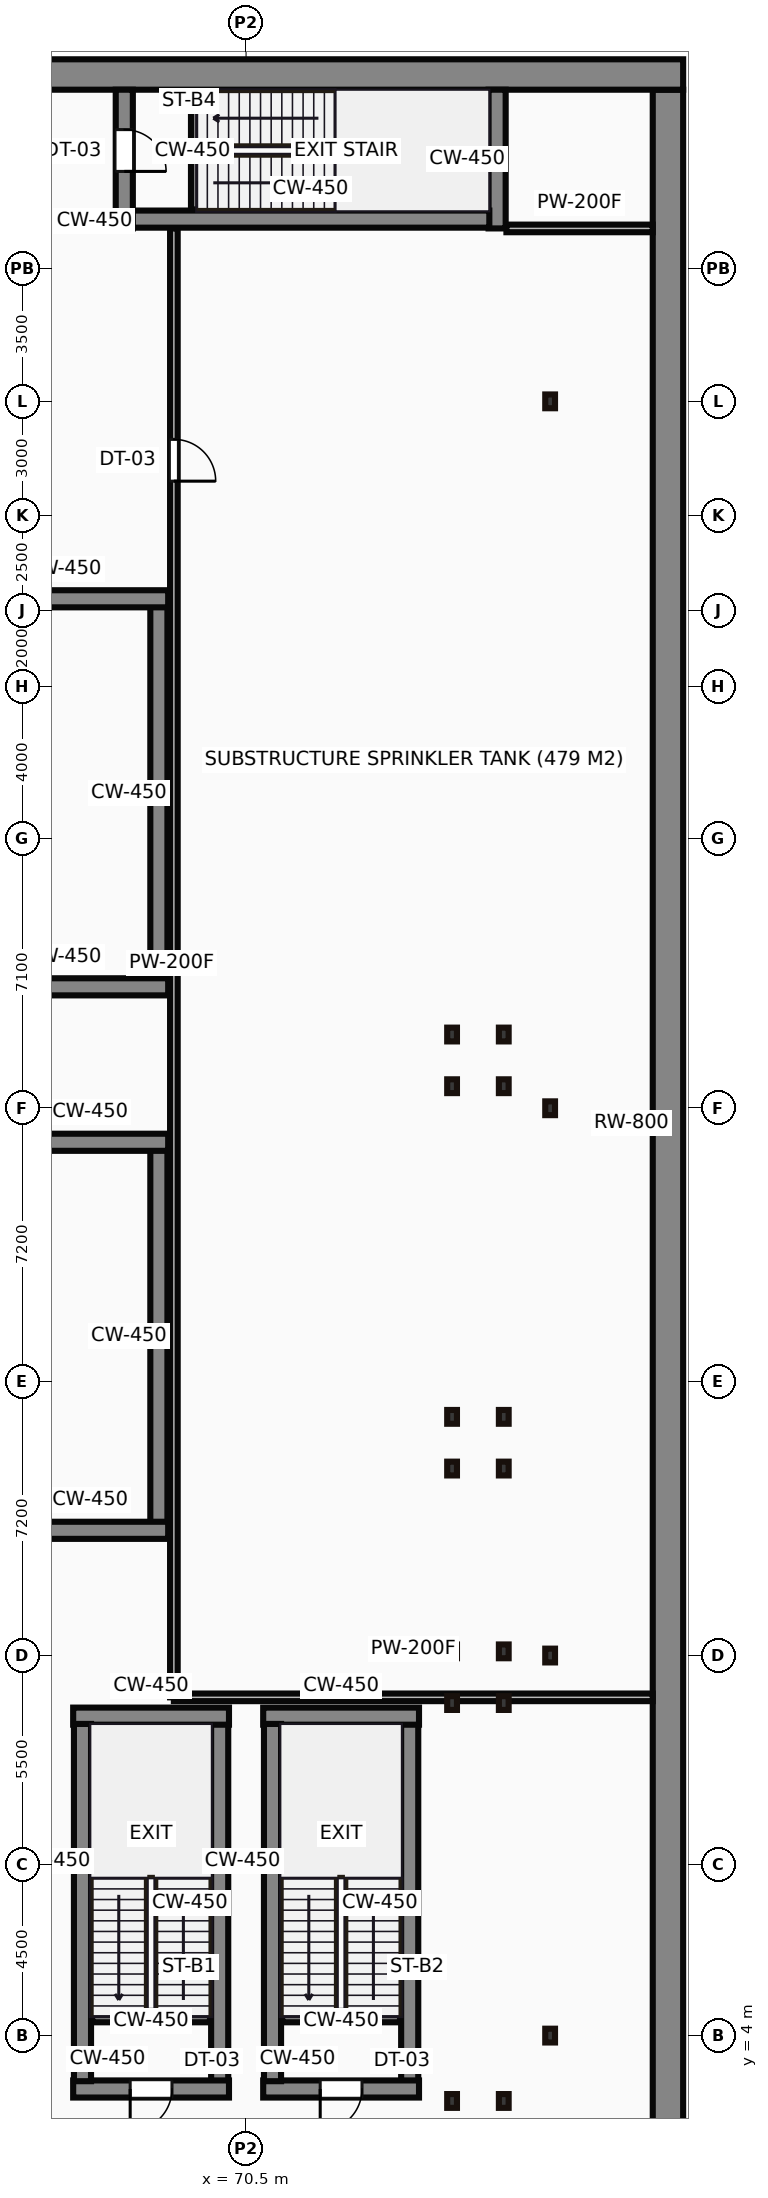
"""IFC4 building model, lengths in metres.
Left out: names, types, materials, properties, quantities, classifications, styles, units other than length and angle.
Written with IfcOpenShell. Run it as: python <this file> out.ifc"""

import sys

from ifc_helpers import new_model, si_unit, direction, frame, frame_2d, origin, origin_2d, place, context, subcontext, project, spatial, rectangle, i_section, extrude, source, transform, mapped, element, fill, save


model = new_model("IFC4")
c1 = context("Model", 3, precision=1e-05, world=origin(), true_north=direction((0.0, 1.0)))
c2 = subcontext(c1, "Body", "Model", "MODEL_VIEW")
j1 = project(units=[si_unit("LENGTHUNIT", "METRE"), si_unit("PLANEANGLEUNIT", "RADIAN")], contexts=[c1])
p1 = place(None, origin())
s1 = spatial("IfcSite", under=j1, at=p1, CompositionType="ELEMENT")
p2 = place(p1, origin())
s2 = spatial("IfcBuilding", under=s1, at=p2, CompositionType="ELEMENT")
p3 = place(p2, frame((0.0, 0.0, -10.0)))
s3 = spatial("IfcBuildingStorey", under=s2, at=p3, CompositionType="ELEMENT", Elevation=-10.0)
m1 = source(origin(), c2, "Body", "SweptSolid", [
    extrude(rectangle(XDim=82.0, YDim=0.8, at=frame_2d((41.0, 0.0))), origin(), (0.0, 0.0, 1.0), 5.0),
])
p4 = place(p3, frame((0.0, 55.6, 0.0), z_axis=(0.0, 0.0, 1.0), x_axis=(1.0, 0.0, 0.0)))
e1 = element("IfcWall", 1, at=p4, inside=s3, PredefinedType="USERDEFINED", context=c2, shape_type="MappedRepresentation", body=[
    mapped(m1, transform((0.0, 0.0, 0.0))),
])
m2 = source(origin(), c2, "Body", "SweptSolid", [
    extrude(rectangle(XDim=54.4, YDim=0.8, at=frame_2d((27.2, 0.0))), origin(), (0.0, 0.0, 1.0), 5.0),
])
p5 = place(p3, frame((81.6, 0.8, 0.0), z_axis=(0.0, 0.0, 1.0), x_axis=(0.0, 1.0, 0.0)))
e2 = element("IfcWall", 2, at=p5, inside=s3, PredefinedType="USERDEFINED", context=c2, shape_type="MappedRepresentation", body=[
    mapped(m2, transform((0.0, 0.0, 0.0))),
])
m3 = source(origin(), c2, "Body", "SweptSolid", [
    extrude(i_section(OverallWidth=0.257, OverallDepth=0.363, WebThickness=0.013, FlangeThickness=0.022, at=origin_2d()), origin(), (0.0, 0.0, 1.0), 5.0),
])
for number, where, z_axis, x_axis in (
    (3, (78.5, 4.0, 0.0), (0.0, 0.0, 1.0), (1.0, 0.0, 0.0)),
    (4, (78.5, 14.0, 0.0), (0.0, 0.0, 1.0), (1.0, 0.0, 0.0)),
    (5, (78.5, 28.4, 0.0), (0.0, 0.0, 1.0), (1.0, 0.0, 0.0)),
    (6, (78.5, 47.0, 0.0), (0.0, 0.0, 1.0), (1.0, 0.0, 0.0)),
):
    element("IfcColumn", number, at=place(p3, frame(where, z_axis=z_axis, x_axis=x_axis)), inside=s3, PredefinedType="COLUMN", context=c2, shape_type="MappedRepresentation", body=[
        mapped(m3, transform((0.0, 0.0, 0.0))),
    ])
m4 = source(origin(), c2, "Body", "SweptSolid", [
    extrude(rectangle(XDim=4.1, YDim=0.45, at=frame_2d((2.05, 0.0))), origin(), (0.0, 0.0, 1.0), 4.55),
])
p6 = place(p3, frame((64.35, 17.295, 0.45), z_axis=(0.0, 0.0, 1.0), x_axis=(1.0, 0.0, 0.0)))
e7 = element("IfcWall", 7, at=p6, inside=s3, PredefinedType="SHEAR", context=c2, shape_type="MappedRepresentation", body=[
    mapped(m4, transform((0.0, 0.0, 0.0))),
])
m5 = source(origin(), c2, "Body", "SweptSolid", [
    extrude(rectangle(XDim=9.8, YDim=0.45, at=frame_2d((4.9, 0.0))), origin(), (0.0, 0.0, 1.0), 4.55),
])
p7 = place(p3, frame((68.205, 17.5, 0.45), z_axis=(0.0, 0.0, 1.0), x_axis=(0.0, 1.0, 0.0)))
e8 = element("IfcWall", 8, at=p7, inside=s3, PredefinedType="SHEAR", context=c2, shape_type="MappedRepresentation", body=[
    mapped(m5, transform((0.0, 0.0, 0.0))),
])
p8 = place(p3, frame((64.35, 27.505, 0.45), z_axis=(0.0, 0.0, 1.0), x_axis=(1.0, 0.0, 0.0)))
e9 = element("IfcWall", 9, at=p8, inside=s3, PredefinedType="SHEAR", context=c2, shape_type="MappedRepresentation", body=[
    mapped(m4, transform((0.0, 0.0, 0.0))),
])
m6 = source(origin(), c2, "Body", "SweptSolid", [
    extrude(rectangle(XDim=5.5, YDim=0.45, at=frame_2d((2.75, 0.0))), origin(), (0.0, 0.0, 1.0), 4.55),
])
p9 = place(p3, frame((62.95, 31.595, 0.45), z_axis=(0.0, 0.0, 1.0), x_axis=(1.0, 0.0, 0.0)))
e10 = element("IfcWall", 10, at=p9, inside=s3, PredefinedType="SHEAR", context=c2, shape_type="MappedRepresentation", body=[
    mapped(m6, transform((0.0, 0.0, 0.0))),
])
p10 = place(p3, frame((68.205, 31.8, 0.45), z_axis=(0.0, 0.0, 1.0), x_axis=(0.0, 1.0, 0.0)))
e11 = element("IfcWall", 11, at=p10, inside=s3, PredefinedType="SHEAR", context=c2, shape_type="MappedRepresentation", body=[
    mapped(m5, transform((0.0, 0.0, 0.0))),
])
p11 = place(p3, frame((62.95, 41.805, 0.45), z_axis=(0.0, 0.0, 1.0), x_axis=(1.0, 0.0, 0.0)))
e12 = element("IfcWall", 12, at=p11, inside=s3, PredefinedType="SHEAR", context=c2, shape_type="MappedRepresentation", body=[
    mapped(m6, transform((0.0, 0.0, 0.0))),
])
m7 = source(origin(), c2, "Body", "SweptSolid", [
    extrude(rectangle(XDim=4.1, YDim=0.45, at=frame_2d((2.05, 0.0))), origin(), (0.0, 0.0, 1.0), 4.55),
])
p12 = place(p3, frame((65.95, 2.595, 0.45), z_axis=(0.0, 0.0, 1.0), x_axis=(1.0, 0.0, 0.0)))
e13 = element("IfcWall", 13, at=p12, inside=s3, PredefinedType="SHEAR", context=c2, shape_type="MappedRepresentation", body=[
    mapped(m7, transform((0.0, 0.0, 0.0))),
])
p13 = place(p12, frame((1.5, 0.0, 0.0)))
e14 = element("IfcOpeningElement", 14, at=p13, cuts=e13, PredefinedType="OPENING", context=c2, shape_type="SweptSolid", body=[
    extrude(rectangle(XDim=1.1, YDim=2.15, at=frame_2d((0.55, 1.075))), frame((0.0, 0.235, 0.0), z_axis=(0.0, -1.0, 0.0), x_axis=(1.0, 0.0, 0.0)), (0.0, 0.0, 1.0), 0.47),
])
m8 = source(origin(), c2, "Body", "SweptSolid", [
    extrude(rectangle(XDim=9.4, YDim=0.45, at=frame_2d((4.7, 0.0))), origin(), (0.0, 0.0, 1.0), 4.55),
])
for number, where, z_axis, x_axis in (
    (15, (66.195, 2.8, 0.45), (0.0, 0.0, 1.0), (0.0, 1.0, 0.0)),
    (16, (69.805, 2.8, 0.45), (0.0, 0.0, 1.0), (0.0, 1.0, 0.0)),
):
    element("IfcWall", number, at=place(p3, frame(where, z_axis=z_axis, x_axis=x_axis)), inside=s3, PredefinedType="SHEAR", context=c2, shape_type="MappedRepresentation", body=[
        mapped(m8, transform((0.0, 0.0, 0.0))),
    ])
p14 = place(p3, frame((65.95, 12.405, 0.45), z_axis=(0.0, 0.0, 1.0), x_axis=(1.0, 0.0, 0.0)))
e17 = element("IfcWall", 17, at=p14, inside=s3, PredefinedType="SHEAR", context=c2, shape_type="MappedRepresentation", body=[
    mapped(m7, transform((0.0, 0.0, 0.0))),
])
m9 = source(origin(), c2, "Body", "SweptSolid", [
    extrude(rectangle(XDim=3.1, YDim=0.3, at=frame_2d((1.55, 0.0))), origin(), (0.0, 0.0, 1.0), 0.3),
])
p15 = place(p3, frame((69.55, 4.5, -0.3), z_axis=(0.0, 0.0, 1.0), x_axis=(-1.0, 0.0, 0.0)))
e18 = element("IfcWall", 18, at=p15, inside=s3, PredefinedType="SHEAR", context=c2, shape_type="MappedRepresentation", body=[
    mapped(m9, transform((0.0, 0.0, 0.0))),
])
p16 = place(p3, frame((70.95, 2.595, 0.45), z_axis=(0.0, 0.0, 1.0), x_axis=(1.0, 0.0, 0.0)))
e19 = element("IfcWall", 19, at=p16, inside=s3, PredefinedType="SHEAR", context=c2, shape_type="MappedRepresentation", body=[
    mapped(m7, transform((0.0, 0.0, 0.0))),
])
p17 = place(p16, frame((1.5, 0.0, 0.0)))
e20 = element("IfcOpeningElement", 20, at=p17, cuts=e19, PredefinedType="OPENING", context=c2, shape_type="SweptSolid", body=[
    extrude(rectangle(XDim=1.1, YDim=2.15, at=frame_2d((0.55, 1.075))), frame((0.0, 0.235, 0.0), z_axis=(0.0, -1.0, 0.0), x_axis=(1.0, 0.0, 0.0)), (0.0, 0.0, 1.0), 0.47),
])
for number, where, z_axis, x_axis in (
    (21, (71.195, 2.8, 0.45), (0.0, 0.0, 1.0), (0.0, 1.0, 0.0)),
    (22, (74.805, 2.8, 0.45), (0.0, 0.0, 1.0), (0.0, 1.0, 0.0)),
):
    element("IfcWall", number, at=place(p3, frame(where, z_axis=z_axis, x_axis=x_axis)), inside=s3, PredefinedType="SHEAR", context=c2, shape_type="MappedRepresentation", body=[
        mapped(m8, transform((0.0, 0.0, 0.0))),
    ])
p18 = place(p3, frame((70.95, 12.405, 0.45), z_axis=(0.0, 0.0, 1.0), x_axis=(1.0, 0.0, 0.0)))
e23 = element("IfcWall", 23, at=p18, inside=s3, PredefinedType="SHEAR", context=c2, shape_type="MappedRepresentation", body=[
    mapped(m7, transform((0.0, 0.0, 0.0))),
])
p19 = place(p3, frame((74.55, 4.5, -0.3), z_axis=(0.0, 0.0, 1.0), x_axis=(-1.0, 0.0, 0.0)))
e24 = element("IfcWall", 24, at=p19, inside=s3, PredefinedType="SHEAR", context=c2, shape_type="MappedRepresentation", body=[
    mapped(m9, transform((0.0, 0.0, 0.0))),
])
m10 = source(origin(), c2, "Body", "SweptSolid", [
    extrude(rectangle(XDim=3.65, YDim=0.45, at=frame_2d((1.825, 0.0))), origin(), (0.0, 0.0, 1.0), 4.55),
])
p20 = place(p3, frame((67.295, 51.55, 0.45), z_axis=(0.0, 0.0, 1.0), x_axis=(0.0, 1.0, 0.0)))
e25 = element("IfcWall", 25, at=p20, inside=s3, PredefinedType="SHEAR", context=c2, shape_type="MappedRepresentation", body=[
    mapped(m10, transform((0.0, 0.0, 0.0))),
])
p21 = place(p20, frame((1.5, 0.0, 0.0)))
e26 = element("IfcOpeningElement", 26, at=p21, cuts=e25, PredefinedType="OPENING", context=c2, shape_type="SweptSolid", body=[
    extrude(rectangle(XDim=1.1, YDim=2.15, at=frame_2d((0.55, 1.075))), frame((0.0, 0.235, 0.0), z_axis=(0.0, -1.0, 0.0), x_axis=(1.0, 0.0, 0.0)), (0.0, 0.0, 1.0), 0.47),
])
p22 = place(p3, frame((67.5, 51.795, 0.45), z_axis=(0.0, 0.0, 1.0), x_axis=(1.0, 0.0, 0.0)))
e27 = element("IfcWall", 27, at=p22, inside=s3, PredefinedType="SHEAR", context=c2, shape_type="MappedRepresentation", body=[
    mapped(m8, transform((0.0, 0.0, 0.0))),
])
p23 = place(p3, frame((77.105, 51.55, 0.45), z_axis=(0.0, 0.0, 1.0), x_axis=(0.0, 1.0, 0.0)))
e28 = element("IfcWall", 28, at=p23, inside=s3, PredefinedType="SHEAR", context=c2, shape_type="MappedRepresentation", body=[
    mapped(m10, transform((0.0, 0.0, 0.0))),
])
m11 = source(origin(), c2, "Body", "SweptSolid", [
    extrude(rectangle(XDim=3.1, YDim=0.3, at=frame_2d((1.55, 0.0))), origin(), (0.0, 0.0, 1.0), 0.3),
])
p24 = place(p3, frame((69.2, 52.05, -0.3), z_axis=(0.0, 0.0, 1.0), x_axis=(0.0, 1.0, 0.0)))
e29 = element("IfcWall", 29, at=p24, inside=s3, PredefinedType="SHEAR", context=c2, shape_type="MappedRepresentation", body=[
    mapped(m11, transform((0.0, 0.0, 0.0))),
])
m12 = source(origin(), c2, "Body", "SweptSolid", [
    extrude(i_section(OverallWidth=0.257, OverallDepth=0.363, WebThickness=0.013, FlangeThickness=0.022, at=origin_2d()), origin(), (0.0, 0.0, 1.0), 4.55),
])
for number, where, z_axis, x_axis in (
    (30, (75.92, 2.28, 0.45), (0.0, 0.0, 1.0), (1.0, 0.0, 0.0)),
    (31, (77.28, 2.28, 0.45), (0.0, 0.0, 1.0), (1.0, 0.0, 0.0)),
    (32, (75.92, 12.75, 0.45), (0.0, 0.0, 1.0), (1.0, 0.0, 0.0)),
    (33, (75.92, 14.11, 0.45), (0.0, 0.0, 1.0), (1.0, 0.0, 0.0)),
    (34, (77.28, 12.75, 0.45), (0.0, 0.0, 1.0), (1.0, 0.0, 0.0)),
    (35, (77.28, 14.11, 0.45), (0.0, 0.0, 1.0), (1.0, 0.0, 0.0)),
    (36, (75.92, 18.92, 0.45), (0.0, 0.0, 1.0), (1.0, 0.0, 0.0)),
    (37, (75.92, 20.28, 0.45), (0.0, 0.0, 1.0), (1.0, 0.0, 0.0)),
    (38, (77.28, 18.92, 0.45), (0.0, 0.0, 1.0), (1.0, 0.0, 0.0)),
    (39, (77.28, 20.28, 0.45), (0.0, 0.0, 1.0), (1.0, 0.0, 0.0)),
    (40, (75.92, 28.98, 0.45), (0.0, 0.0, 1.0), (1.0, 0.0, 0.0)),
    (41, (75.92, 30.34, 0.45), (0.0, 0.0, 1.0), (1.0, 0.0, 0.0)),
    (42, (77.28, 28.98, 0.45), (0.0, 0.0, 1.0), (1.0, 0.0, 0.0)),
    (43, (77.28, 30.34, 0.45), (0.0, 0.0, 1.0), (1.0, 0.0, 0.0)),
):
    element("IfcColumn", number, at=place(p3, frame(where, z_axis=z_axis, x_axis=x_axis)), inside=s3, PredefinedType="COLUMN", context=c2, shape_type="MappedRepresentation", body=[
        mapped(m12, transform((0.0, 0.0, 0.0))),
    ])
m13 = source(origin(), c2, "Body", "SweptSolid", [
    extrude(rectangle(XDim=38.65, YDim=0.2, at=frame_2d((19.325, 0.0))), origin(), (0.0, 0.0, 1.0), 4.25),
])
p25 = place(p3, frame((68.6, 12.9, 0.45), z_axis=(0.0, 0.0, 1.0), x_axis=(0.0, 1.0, 0.0)))
e44 = element("IfcWall", 44, at=p25, inside=s3, PredefinedType="PARTITIONING", context=c2, shape_type="MappedRepresentation", body=[
    mapped(m13, transform((0.0, 0.0, 0.0))),
])
p26 = place(p25, frame((32.0, 0.0, 0.0)))
e45 = element("IfcOpeningElement", 45, at=p26, cuts=e44, PredefinedType="OPENING", context=c2, shape_type="SweptSolid", body=[
    extrude(rectangle(XDim=1.1, YDim=2.15, at=frame_2d((0.55, 1.075))), frame((0.0, 0.11, 0.0), z_axis=(0.0, -1.0, 0.0), x_axis=(1.0, 0.0, 0.0)), (0.0, 0.0, 1.0), 0.22),
])
m14 = source(origin(), c2, "Body", "SweptSolid", [
    extrude(rectangle(XDim=12.6, YDim=0.2, at=frame_2d((6.3, 0.0))), origin(), (0.0, 0.0, 1.0), 4.25),
])
p27 = place(p3, frame((68.6, 12.9, 0.45), z_axis=(0.0, 0.0, 1.0), x_axis=(1.0, 0.0, 0.0)))
e46 = element("IfcWall", 46, at=p27, inside=s3, PredefinedType="PARTITIONING", context=c2, shape_type="MappedRepresentation", body=[
    mapped(m14, transform((0.0, 0.0, 0.0))),
])
m15 = source(origin(), c2, "Body", "SweptSolid", [
    extrude(rectangle(XDim=3.85, YDim=0.2, at=frame_2d((1.925, 0.0))), origin(), (0.0, 0.0, 1.0), 4.25),
])
p28 = place(p3, frame((77.35, 51.55, 0.45), z_axis=(0.0, 0.0, 1.0), x_axis=(1.0, 0.0, 0.0)))
e47 = element("IfcWall", 47, at=p28, inside=s3, PredefinedType="PARTITIONING", context=c2, shape_type="MappedRepresentation", body=[
    mapped(m15, transform((0.0, 0.0, 0.0))),
])
m16 = source(origin(), c2, "Body", "SweptSolid", [
    extrude(rectangle(XDim=1.1, YDim=2.15, at=frame_2d((0.55, 1.075))), frame((0.0, 0.025, 0.0), z_axis=(0.0, -1.0, 0.0), x_axis=(1.0, 0.0, 0.0)), (0.0, 0.0, 1.0), 0.05),
])
p29 = place(p26, origin())
e48 = element("IfcDoor", 48, at=p29, inside=s3, OperationType="SINGLE_SWING_LEFT", PredefinedType="DOOR", context=c2, shape_type="MappedRepresentation", body=[
    mapped(m16, transform((0.0, 0.0, 0.0))),
])
fill(e45, e48)
p30 = place(p13, origin())
e49 = element("IfcDoor", 49, at=p30, inside=s3, OperationType="SINGLE_SWING_LEFT", PredefinedType="DOOR", context=c2, shape_type="MappedRepresentation", body=[
    mapped(m16, transform((0.0, 0.0, 0.0))),
])
fill(e14, e49)
p31 = place(p17, origin())
e50 = element("IfcDoor", 50, at=p31, inside=s3, OperationType="SINGLE_SWING_LEFT", PredefinedType="DOOR", context=c2, shape_type="MappedRepresentation", body=[
    mapped(m16, transform((0.0, 0.0, 0.0))),
])
fill(e20, e50)
p32 = place(p21, frame((1.1, 0.0, 0.0), z_axis=(0.0, 0.0, 1.0), x_axis=(-1.0, 0.0, 0.0)))
e51 = element("IfcDoor", 51, at=p32, inside=s3, OperationType="SINGLE_SWING_LEFT", PredefinedType="DOOR", context=c2, shape_type="MappedRepresentation", body=[
    mapped(m16, transform((0.0, 0.0, 0.0))),
])
fill(e26, e51)
save(model, sys.argv[1])
